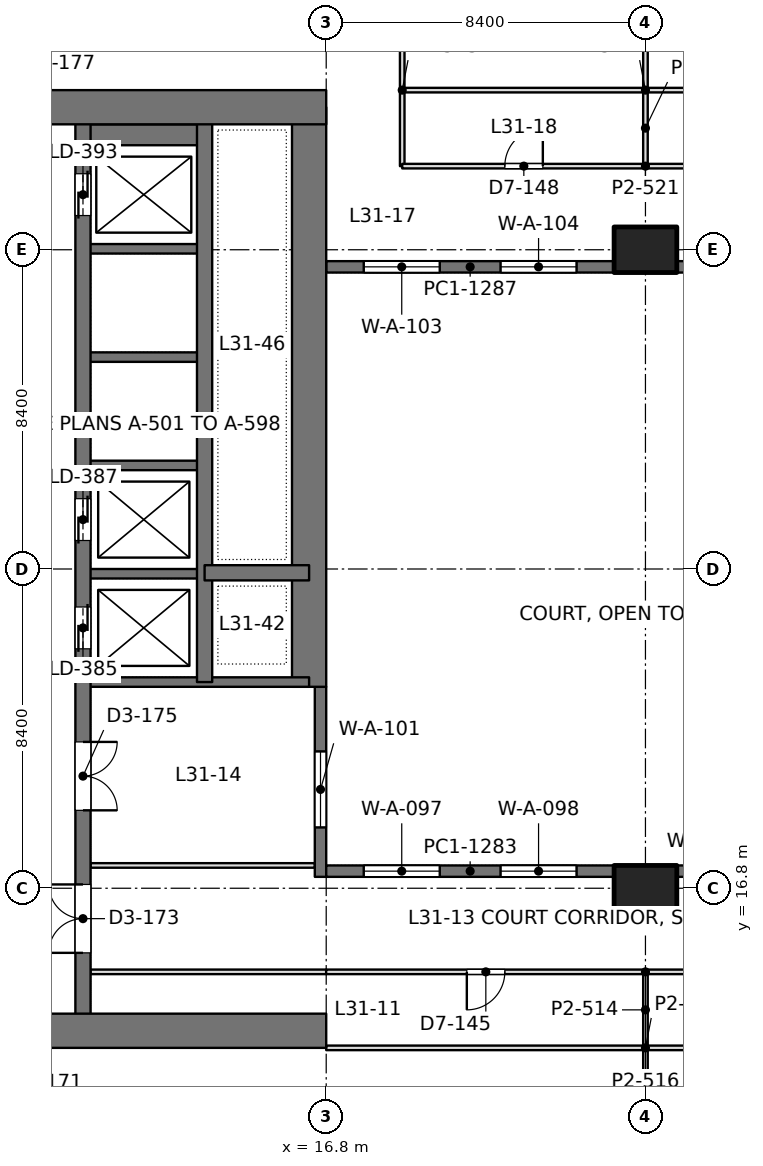
"""IFC4 building model, lengths in metres.
Left out: names, types, materials, properties, quantities, classifications, styles, units other than length and angle.
Written with IfcOpenShell. Run it as: python <this file> out.ifc"""

import sys

from ifc_helpers import new_model, si_unit, direction, frame, frame_2d, origin, origin_2d, place, context, subcontext, project, spatial, rectangle, extrude, element, fill, save


model = new_model("IFC4")
c1 = context("Model", 3, precision=1e-05, world=origin(), true_north=direction((0.0, 1.0)))
c2 = subcontext(c1, "Body", "Model", "MODEL_VIEW")
j1 = project(units=[si_unit("LENGTHUNIT", "METRE"), si_unit("PLANEANGLEUNIT", "RADIAN")], contexts=[c1])
p1 = place(None, origin())
s1 = spatial("IfcSite", under=j1, at=p1, CompositionType="ELEMENT")
p2 = place(p1, origin())
s2 = spatial("IfcBuilding", under=s1, at=p2, CompositionType="ELEMENT")
p3 = place(p2, frame((0.0, 0.0, 138.6)))
s3 = spatial("IfcBuildingStorey", under=s2, at=p3, CompositionType="ELEMENT", Elevation=138.6)
for number, where, z_axis, x_axis in (
    (1, (25.2, 16.8, 0.0), (0.0, 0.0, 1.0), (1.0, 0.0, 0.0)),
    (2, (25.2, 33.6, 0.0), (0.0, 0.0, 1.0), (1.0, 0.0, 0.0)),
):
    element("IfcColumn", number, at=place(p3, frame(where, z_axis=z_axis, x_axis=x_axis)), inside=s3, PredefinedType="COLUMN", context=c2, shape_type="SweptSolid", body=[
        extrude(rectangle(XDim=1.65, YDim=1.2, at=origin_2d()), origin(), (0.0, 0.0, 1.0), 4.2),
    ])
p4 = place(p3, frame((-1.2, 13.05, 0.0), z_axis=(0.0, 0.0, 1.0), x_axis=(1.0, 0.0, 0.0)))
e3 = element("IfcWall", 3, at=p4, inside=s3, PredefinedType="SHEAR", context=c2, shape_type="SweptSolid", body=[
    extrude(rectangle(XDim=18.0, YDim=0.9, at=frame_2d((9.0, 0.0))), origin(), (0.0, 0.0, 1.0), 4.2),
])
p5 = place(p4, frame((8.95, 0.0, 0.0)))
e4 = element("IfcOpeningElement", 4, at=p5, cuts=e3, PredefinedType="OPENING", context=c2, shape_type="SweptSolid", body=[
    extrude(rectangle(XDim=1.8, YDim=2.4, at=frame_2d((0.9, 1.2))), frame((0.0, 0.46, 0.0), z_axis=(0.0, -1.0, 0.0), x_axis=(1.0, 0.0, 0.0)), (0.0, 0.0, 1.0), 0.92),
])
p6 = place(p3, frame((-1.2, 37.35, 0.0), z_axis=(0.0, 0.0, 1.0), x_axis=(1.0, 0.0, 0.0)))
e5 = element("IfcWall", 5, at=p6, inside=s3, PredefinedType="SHEAR", context=c2, shape_type="SweptSolid", body=[
    extrude(rectangle(XDim=18.0, YDim=0.9, at=frame_2d((9.0, 0.0))), origin(), (0.0, 0.0, 1.0), 4.2),
])
p7 = place(p6, frame((8.95, 0.0, 0.0)))
e6 = element("IfcOpeningElement", 6, at=p7, cuts=e5, PredefinedType="OPENING", context=c2, shape_type="SweptSolid", body=[
    extrude(rectangle(XDim=1.8, YDim=2.4, at=frame_2d((0.9, 1.2))), frame((0.0, 0.46, 0.0), z_axis=(0.0, -1.0, 0.0), x_axis=(1.0, 0.0, 0.0)), (0.0, 0.0, 1.0), 0.92),
])
p8 = place(p3, frame((16.35, 22.1, 0.0), z_axis=(0.0, 0.0, 1.0), x_axis=(0.0, 1.0, 0.0)))
e7 = element("IfcWall", 7, at=p8, inside=s3, PredefinedType="SHEAR", context=c2, shape_type="SweptSolid", body=[
    extrude(rectangle(XDim=15.25, YDim=0.9, at=frame_2d((7.625, 0.0))), origin(), (0.0, 0.0, 1.0), 4.2),
])
p9 = place(p3, frame((10.4, 13.05, 0.0), z_axis=(0.0, 0.0, 1.0), x_axis=(0.0, 1.0, 0.0)))
e8 = element("IfcWall", 8, at=p9, inside=s3, PredefinedType="SHEAR", context=c2, shape_type="SweptSolid", body=[
    extrude(rectangle(XDim=24.3, YDim=0.4, at=frame_2d((12.15, 0.0))), origin(), (0.0, 0.0, 1.0), 4.2),
])
p10 = place(p9, frame((10.05, 0.0, 0.0)))
e9 = element("IfcOpeningElement", 9, at=p10, cuts=e8, PredefinedType="OPENING", context=c2, shape_type="SweptSolid", body=[
    extrude(rectangle(XDim=1.1, YDim=2.2, at=frame_2d((0.55, 1.1))), frame((0.0, 0.21, 0.0), z_axis=(0.0, -1.0, 0.0), x_axis=(1.0, 0.0, 0.0)), (0.0, 0.0, 1.0), 0.42),
])
p11 = place(p9, frame((12.9, 0.0, 0.0)))
e10 = element("IfcOpeningElement", 10, at=p11, cuts=e8, PredefinedType="OPENING", context=c2, shape_type="SweptSolid", body=[
    extrude(rectangle(XDim=1.1, YDim=2.2, at=frame_2d((0.55, 1.1))), frame((0.0, 0.21, 0.0), z_axis=(0.0, -1.0, 0.0), x_axis=(1.0, 0.0, 0.0)), (0.0, 0.0, 1.0), 0.42),
])
p12 = place(p9, frame((21.45, 0.0, 0.0)))
e11 = element("IfcOpeningElement", 11, at=p12, cuts=e8, PredefinedType="OPENING", context=c2, shape_type="SweptSolid", body=[
    extrude(rectangle(XDim=1.1, YDim=2.2, at=frame_2d((0.55, 1.1))), frame((0.0, 0.21, 0.0), z_axis=(0.0, -1.0, 0.0), x_axis=(1.0, 0.0, 0.0)), (0.0, 0.0, 1.0), 0.42),
])
p13 = place(p9, frame((2.05, 0.0, 0.0)))
e12 = element("IfcOpeningElement", 12, at=p13, cuts=e8, PredefinedType="OPENING", context=c2, shape_type="SweptSolid", body=[
    extrude(rectangle(XDim=1.8, YDim=2.4, at=frame_2d((0.9, 1.2))), frame((0.0, 0.21, 0.0), z_axis=(0.0, -1.0, 0.0), x_axis=(1.0, 0.0, 0.0)), (0.0, 0.0, 1.0), 0.42),
])
p14 = place(p9, frame((5.8, 0.0, 0.0)))
e13 = element("IfcOpeningElement", 13, at=p14, cuts=e8, PredefinedType="OPENING", context=c2, shape_type="SweptSolid", body=[
    extrude(rectangle(XDim=1.8, YDim=2.4, at=frame_2d((0.9, 1.2))), frame((0.0, 0.21, 0.0), z_axis=(0.0, -1.0, 0.0), x_axis=(1.0, 0.0, 0.0)), (0.0, 0.0, 1.0), 0.42),
])
p15 = place(p3, frame((13.6, 22.225, 0.0), z_axis=(0.0, 0.0, 1.0), x_axis=(0.0, 1.0, 0.0)))
e14 = element("IfcWall", 14, at=p15, inside=s3, PredefinedType="SHEAR", context=c2, shape_type="SweptSolid", body=[
    extrude(rectangle(XDim=15.125, YDim=0.4, at=frame_2d((7.562, 0.0))), origin(), (0.0, 0.0, 1.0), 4.2),
])
p16 = place(p3, frame((13.6, 25.1, 0.0), z_axis=(0.0, 0.0, 1.0), x_axis=(1.0, 0.0, 0.0)))
e15 = element("IfcWall", 15, at=p16, inside=s3, PredefinedType="SHEAR", context=c2, shape_type="SweptSolid", body=[
    extrude(rectangle(XDim=2.75, YDim=0.4, at=frame_2d((1.375, 0.0))), origin(), (0.0, 0.0, 1.0), 4.2),
])
p17 = place(p3, frame((10.4, 22.225, 0.0), z_axis=(0.0, 0.0, 1.0), x_axis=(1.0, 0.0, 0.0)))
e16 = element("IfcWall", 16, at=p17, inside=s3, PredefinedType="SHEAR", context=c2, shape_type="SweptSolid", body=[
    extrude(rectangle(XDim=5.95, YDim=0.25, at=frame_2d((2.975, 0.0))), origin(), (0.0, 0.0, 1.0), 4.2),
])
for number, where, z_axis, x_axis in (
    (17, (10.4, 25.075, 0.0), (0.0, 0.0, 1.0), (1.0, 0.0, 0.0)),
    (18, (10.4, 27.925, 0.0), (0.0, 0.0, 1.0), (1.0, 0.0, 0.0)),
    (19, (10.4, 30.775, 0.0), (0.0, 0.0, 1.0), (1.0, 0.0, 0.0)),
    (20, (10.4, 33.625, 0.0), (0.0, 0.0, 1.0), (1.0, 0.0, 0.0)),
):
    element("IfcWall", number, at=place(p3, frame(where, z_axis=z_axis, x_axis=x_axis)), inside=s3, PredefinedType="SHEAR", context=c2, shape_type="SweptSolid", body=[
        extrude(rectangle(XDim=3.2, YDim=0.25, at=frame_2d((1.6, 0.0))), origin(), (0.0, 0.0, 1.0), 4.2),
    ])
p18 = place(p3, frame((10.4, 36.625, 0.0), z_axis=(0.0, 0.0, 1.0), x_axis=(1.0, 0.0, 0.0)))
e21 = element("IfcWall", 21, at=p18, inside=s3, PredefinedType="SHEAR", context=c2, shape_type="SweptSolid", body=[
    extrude(rectangle(XDim=3.2, YDim=0.55, at=frame_2d((1.6, 0.0))), origin(), (0.0, 0.0, 1.0), 4.2),
])
p19 = place(p3, frame((16.65, 17.1, 0.0), z_axis=(0.0, 0.0, 1.0), x_axis=(0.0, 1.0, 0.0)))
e22 = element("IfcWall", 22, at=p19, inside=s3, PredefinedType="SOLIDWALL", context=c2, shape_type="SweptSolid", body=[
    extrude(rectangle(XDim=5.0, YDim=0.3, at=frame_2d((2.5, 0.0))), origin(), (0.0, 0.0, 1.0), 4.05),
])
p20 = place(p19, frame((1.3, 0.0, 0.1)))
e23 = element("IfcOpeningElement", 23, at=p20, cuts=e22, PredefinedType="OPENING", context=c2, shape_type="SweptSolid", body=[
    extrude(rectangle(XDim=2.0, YDim=3.0, at=frame_2d((1.0, 1.5))), frame((0.0, 0.16, 0.0), z_axis=(0.0, -1.0, 0.0), x_axis=(1.0, 0.0, 0.0)), (0.0, 0.0, 1.0), 0.32),
])
p21 = place(p3, frame((16.8, 17.25, 0.0), z_axis=(0.0, 0.0, 1.0), x_axis=(1.0, 0.0, 0.0)))
e24 = element("IfcWall", 24, at=p21, inside=s3, PredefinedType="SOLIDWALL", context=c2, shape_type="SweptSolid", body=[
    extrude(rectangle(XDim=7.575, YDim=0.3, at=frame_2d((3.788, 0.0))), origin(), (0.0, 0.0, 1.0), 4.05),
])
p22 = place(p21, frame((0.988, 0.0, 0.1)))
e25 = element("IfcOpeningElement", 25, at=p22, cuts=e24, PredefinedType="OPENING", context=c2, shape_type="SweptSolid", body=[
    extrude(rectangle(XDim=2.0, YDim=3.0, at=frame_2d((1.0, 1.5))), frame((0.0, 0.16, 0.0), z_axis=(0.0, -1.0, 0.0), x_axis=(1.0, 0.0, 0.0)), (0.0, 0.0, 1.0), 0.32),
])
p23 = place(p21, frame((4.587, 0.0, 0.1)))
e26 = element("IfcOpeningElement", 26, at=p23, cuts=e24, PredefinedType="OPENING", context=c2, shape_type="SweptSolid", body=[
    extrude(rectangle(XDim=2.0, YDim=3.0, at=frame_2d((1.0, 1.5))), frame((0.0, 0.16, 0.0), z_axis=(0.0, -1.0, 0.0), x_axis=(1.0, 0.0, 0.0)), (0.0, 0.0, 1.0), 0.32),
])
p24 = place(p3, frame((26.025, 17.25, 0.0), z_axis=(0.0, 0.0, 1.0), x_axis=(1.0, 0.0, 0.0)))
e27 = element("IfcWall", 27, at=p24, inside=s3, PredefinedType="SOLIDWALL", context=c2, shape_type="SweptSolid", body=[
    extrude(rectangle(XDim=7.575, YDim=0.3, at=frame_2d((3.788, 0.0))), origin(), (0.0, 0.0, 1.0), 4.05),
])
p25 = place(p24, frame((0.587, 0.0, 0.1)))
e28 = element("IfcOpeningElement", 28, at=p25, cuts=e27, PredefinedType="OPENING", context=c2, shape_type="SweptSolid", body=[
    extrude(rectangle(XDim=2.0, YDim=3.0, at=frame_2d((1.0, 1.5))), frame((0.0, 0.16, 0.0), z_axis=(0.0, -1.0, 0.0), x_axis=(1.0, 0.0, 0.0)), (0.0, 0.0, 1.0), 0.32),
])
p26 = place(p24, frame((4.188, 0.0, 0.1)))
e29 = element("IfcOpeningElement", 29, at=p26, cuts=e27, PredefinedType="OPENING", context=c2, shape_type="SweptSolid", body=[
    extrude(rectangle(XDim=2.0, YDim=3.0, at=frame_2d((1.0, 1.5))), frame((0.0, 0.16, 0.0), z_axis=(0.0, -1.0, 0.0), x_axis=(1.0, 0.0, 0.0)), (0.0, 0.0, 1.0), 0.32),
])
p27 = place(p3, frame((16.8, 33.15, 0.0), z_axis=(0.0, 0.0, 1.0), x_axis=(1.0, 0.0, 0.0)))
e30 = element("IfcWall", 30, at=p27, inside=s3, PredefinedType="SOLIDWALL", context=c2, shape_type="SweptSolid", body=[
    extrude(rectangle(XDim=7.575, YDim=0.3, at=frame_2d((3.788, 0.0))), origin(), (0.0, 0.0, 1.0), 4.05),
])
p28 = place(p27, frame((0.988, 0.0, 0.1)))
e31 = element("IfcOpeningElement", 31, at=p28, cuts=e30, PredefinedType="OPENING", context=c2, shape_type="SweptSolid", body=[
    extrude(rectangle(XDim=2.0, YDim=3.0, at=frame_2d((1.0, 1.5))), frame((0.0, 0.16, 0.0), z_axis=(0.0, -1.0, 0.0), x_axis=(1.0, 0.0, 0.0)), (0.0, 0.0, 1.0), 0.32),
])
p29 = place(p27, frame((4.587, 0.0, 0.1)))
e32 = element("IfcOpeningElement", 32, at=p29, cuts=e30, PredefinedType="OPENING", context=c2, shape_type="SweptSolid", body=[
    extrude(rectangle(XDim=2.0, YDim=3.0, at=frame_2d((1.0, 1.5))), frame((0.0, 0.16, 0.0), z_axis=(0.0, -1.0, 0.0), x_axis=(1.0, 0.0, 0.0)), (0.0, 0.0, 1.0), 0.32),
])
p30 = place(p3, frame((26.025, 33.15, 0.0), z_axis=(0.0, 0.0, 1.0), x_axis=(1.0, 0.0, 0.0)))
e33 = element("IfcWall", 33, at=p30, inside=s3, PredefinedType="SOLIDWALL", context=c2, shape_type="SweptSolid", body=[
    extrude(rectangle(XDim=7.575, YDim=0.3, at=frame_2d((3.788, 0.0))), origin(), (0.0, 0.0, 1.0), 4.05),
])
p31 = place(p30, frame((0.587, 0.0, 0.1)))
e34 = element("IfcOpeningElement", 34, at=p31, cuts=e33, PredefinedType="OPENING", context=c2, shape_type="SweptSolid", body=[
    extrude(rectangle(XDim=2.0, YDim=3.0, at=frame_2d((1.0, 1.5))), frame((0.0, 0.16, 0.0), z_axis=(0.0, -1.0, 0.0), x_axis=(1.0, 0.0, 0.0)), (0.0, 0.0, 1.0), 0.32),
])
p32 = place(p30, frame((4.188, 0.0, 0.1)))
e35 = element("IfcOpeningElement", 35, at=p32, cuts=e33, PredefinedType="OPENING", context=c2, shape_type="SweptSolid", body=[
    extrude(rectangle(XDim=2.0, YDim=3.0, at=frame_2d((1.0, 1.5))), frame((0.0, 0.16, 0.0), z_axis=(0.0, -1.0, 0.0), x_axis=(1.0, 0.0, 0.0)), (0.0, 0.0, 1.0), 0.32),
])
p33 = place(p3, frame((10.598, 17.4, 0.0), z_axis=(0.0, 0.0, 1.0), x_axis=(1.0, 0.0, 0.0)))
e36 = element("IfcWall", 36, at=p33, inside=s3, PredefinedType="PARTITIONING", context=c2, shape_type="SweptSolid", body=[
    extrude(rectangle(XDim=5.904, YDim=0.12, at=frame_2d((2.952, 0.0))), origin(), (0.0, 0.0, 1.0), 3.55),
])
p34 = place(p3, frame((25.2, 9.099, 0.0), z_axis=(0.0, 0.0, 1.0), x_axis=(0.0, 1.0, 0.0)))
e37 = element("IfcWall", 37, at=p34, inside=s3, PredefinedType="PARTITIONING", context=c2, shape_type="SweptSolid", body=[
    extrude(rectangle(XDim=3.443, YDim=0.12, at=frame_2d((1.721, 0.0))), origin(), (0.0, 0.0, 1.0), 3.55),
])
p35 = place(p3, frame((10.598, 14.6, 0.0), z_axis=(0.0, 0.0, 1.0), x_axis=(1.0, 0.0, 0.0)))
e38 = element("IfcWall", 38, at=p35, inside=s3, PredefinedType="PARTITIONING", context=c2, shape_type="SweptSolid", body=[
    extrude(rectangle(XDim=6.204, YDim=0.12, at=frame_2d((3.102, 0.0))), origin(), (0.0, 0.0, 1.0), 3.55),
])
p36 = place(p3, frame((25.2, 12.658, 0.0), z_axis=(0.0, 0.0, 1.0), x_axis=(0.0, 1.0, 0.0)))
e39 = element("IfcWall", 39, at=p36, inside=s3, PredefinedType="PARTITIONING", context=c2, shape_type="SweptSolid", body=[
    extrude(rectangle(XDim=1.884, YDim=0.12, at=frame_2d((0.942, 0.0))), origin(), (0.0, 0.0, 1.0), 3.55),
])
p37 = place(p3, frame((16.798, 14.6, 0.0), z_axis=(0.0, 0.0, 1.0), x_axis=(1.0, 0.0, 0.0)))
e40 = element("IfcWall", 40, at=p37, inside=s3, PredefinedType="PARTITIONING", context=c2, shape_type="SweptSolid", body=[
    extrude(rectangle(XDim=16.804, YDim=0.12, at=frame_2d((8.402, 0.0))), origin(), (0.0, 0.0, 1.0), 3.55),
])
p38 = place(p37, frame((3.702, 0.0, 0.0)))
e41 = element("IfcOpeningElement", 41, at=p38, cuts=e40, PredefinedType="OPENING", context=c2, shape_type="SweptSolid", body=[
    extrude(rectangle(XDim=1.0, YDim=2.4, at=frame_2d((0.5, 1.2))), frame((0.0, 0.07, 0.0), z_axis=(0.0, -1.0, 0.0), x_axis=(1.0, 0.0, 0.0)), (0.0, 0.0, 1.0), 0.14),
])
p39 = place(p37, frame((12.102, 0.0, 0.0)))
e42 = element("IfcOpeningElement", 42, at=p39, cuts=e40, PredefinedType="OPENING", context=c2, shape_type="SweptSolid", body=[
    extrude(rectangle(XDim=1.0, YDim=2.4, at=frame_2d((0.5, 1.2))), frame((0.0, 0.07, 0.0), z_axis=(0.0, -1.0, 0.0), x_axis=(1.0, 0.0, 0.0)), (0.0, 0.0, 1.0), 0.14),
])
p40 = place(p3, frame((16.8, 12.6, 0.0), z_axis=(0.0, 0.0, 1.0), x_axis=(1.0, 0.0, 0.0)))
e43 = element("IfcWall", 43, at=p40, inside=s3, PredefinedType="PARTITIONING", context=c2, shape_type="SweptSolid", body=[
    extrude(rectangle(XDim=16.8, YDim=0.12, at=frame_2d((8.4, 0.0))), origin(), (0.0, 0.0, 1.0), 3.55),
])
p41 = place(p3, frame((25.2, 37.858, 0.0), z_axis=(0.0, 0.0, 1.0), x_axis=(0.0, 1.0, 0.0)))
e44 = element("IfcWall", 44, at=p41, inside=s3, PredefinedType="PARTITIONING", context=c2, shape_type="SweptSolid", body=[
    extrude(rectangle(XDim=3.443, YDim=0.12, at=frame_2d((1.722, 0.0))), origin(), (0.0, 0.0, 1.0), 3.55),
])
p42 = place(p3, frame((18.8, 35.8, 0.0), z_axis=(0.0, 0.0, 1.0), x_axis=(0.0, 1.0, 0.0)))
e45 = element("IfcWall", 45, at=p42, inside=s3, PredefinedType="PARTITIONING", context=c2, shape_type="SweptSolid", body=[
    extrude(rectangle(XDim=4.0, YDim=0.12, at=frame_2d((2.0, 0.0))), origin(), (0.0, 0.0, 1.0), 4.05),
])
p43 = place(p3, frame((25.2, 35.858, 0.0), z_axis=(0.0, 0.0, 1.0), x_axis=(0.0, 1.0, 0.0)))
e46 = element("IfcWall", 46, at=p43, inside=s3, PredefinedType="PARTITIONING", context=c2, shape_type="SweptSolid", body=[
    extrude(rectangle(XDim=1.884, YDim=0.12, at=frame_2d((0.942, 0.0))), origin(), (0.0, 0.0, 1.0), 3.55),
])
p44 = place(p3, frame((18.8, 35.8, 0.0), z_axis=(0.0, 0.0, 1.0), x_axis=(1.0, 0.0, 0.0)))
e47 = element("IfcWall", 47, at=p44, inside=s3, PredefinedType="PARTITIONING", context=c2, shape_type="SweptSolid", body=[
    extrude(rectangle(XDim=12.8, YDim=0.12, at=frame_2d((6.4, 0.0))), origin(), (0.0, 0.0, 1.0), 3.55),
])
p45 = place(p44, frame((2.7, 0.0, 0.0)))
e48 = element("IfcOpeningElement", 48, at=p45, cuts=e47, PredefinedType="OPENING", context=c2, shape_type="SweptSolid", body=[
    extrude(rectangle(XDim=1.0, YDim=2.4, at=frame_2d((0.5, 1.2))), frame((0.0, 0.07, 0.0), z_axis=(0.0, -1.0, 0.0), x_axis=(1.0, 0.0, 0.0)), (0.0, 0.0, 1.0), 0.14),
])
p46 = place(p44, frame((9.1, 0.0, 0.0)))
e49 = element("IfcOpeningElement", 49, at=p46, cuts=e47, PredefinedType="OPENING", context=c2, shape_type="SweptSolid", body=[
    extrude(rectangle(XDim=1.0, YDim=2.4, at=frame_2d((0.5, 1.2))), frame((0.0, 0.07, 0.0), z_axis=(0.0, -1.0, 0.0), x_axis=(1.0, 0.0, 0.0)), (0.0, 0.0, 1.0), 0.14),
])
p47 = place(p3, frame((18.858, 37.8, 0.0), z_axis=(0.0, 0.0, 1.0), x_axis=(1.0, 0.0, 0.0)))
e50 = element("IfcWall", 50, at=p47, inside=s3, PredefinedType="PARTITIONING", context=c2, shape_type="SweptSolid", body=[
    extrude(rectangle(XDim=12.684, YDim=0.12, at=frame_2d((6.342, 0.0))), origin(), (0.0, 0.0, 1.0), 3.55),
])
p48 = place(p20, origin())
e51 = element("IfcWindow", 51, at=p48, inside=s3, PartitioningType="SINGLE_PANEL", PredefinedType="WINDOW", context=c2, shape_type="SweptSolid", body=[
    extrude(rectangle(XDim=2.0, YDim=3.0, at=frame_2d((1.0, 1.5))), frame((0.0, 0.03, 0.0), z_axis=(0.0, -1.0, 0.0), x_axis=(1.0, 0.0, 0.0)), (0.0, 0.0, 1.0), 0.06),
])
fill(e23, e51)
p49 = place(p22, origin())
e52 = element("IfcWindow", 52, at=p49, inside=s3, PartitioningType="SINGLE_PANEL", PredefinedType="WINDOW", context=c2, shape_type="SweptSolid", body=[
    extrude(rectangle(XDim=2.0, YDim=3.0, at=frame_2d((1.0, 1.5))), frame((0.0, 0.03, 0.0), z_axis=(0.0, -1.0, 0.0), x_axis=(1.0, 0.0, 0.0)), (0.0, 0.0, 1.0), 0.06),
])
fill(e25, e52)
p50 = place(p23, origin())
e53 = element("IfcWindow", 53, at=p50, inside=s3, PartitioningType="SINGLE_PANEL", PredefinedType="WINDOW", context=c2, shape_type="SweptSolid", body=[
    extrude(rectangle(XDim=2.0, YDim=3.0, at=frame_2d((1.0, 1.5))), frame((0.0, 0.03, 0.0), z_axis=(0.0, -1.0, 0.0), x_axis=(1.0, 0.0, 0.0)), (0.0, 0.0, 1.0), 0.06),
])
fill(e26, e53)
p51 = place(p28, origin())
e54 = element("IfcWindow", 54, at=p51, inside=s3, PartitioningType="SINGLE_PANEL", PredefinedType="WINDOW", context=c2, shape_type="SweptSolid", body=[
    extrude(rectangle(XDim=2.0, YDim=3.0, at=frame_2d((1.0, 1.5))), frame((0.0, 0.03, 0.0), z_axis=(0.0, -1.0, 0.0), x_axis=(1.0, 0.0, 0.0)), (0.0, 0.0, 1.0), 0.06),
])
fill(e31, e54)
p52 = place(p29, origin())
e55 = element("IfcWindow", 55, at=p52, inside=s3, PartitioningType="SINGLE_PANEL", PredefinedType="WINDOW", context=c2, shape_type="SweptSolid", body=[
    extrude(rectangle(XDim=2.0, YDim=3.0, at=frame_2d((1.0, 1.5))), frame((0.0, 0.03, 0.0), z_axis=(0.0, -1.0, 0.0), x_axis=(1.0, 0.0, 0.0)), (0.0, 0.0, 1.0), 0.06),
])
fill(e32, e55)
p53 = place(p10, origin())
e56 = element("IfcDoor", 56, at=p53, inside=s3, OperationType="DOUBLE_DOOR_SLIDING", PredefinedType="DOOR", context=c2, shape_type="SweptSolid", body=[
    extrude(rectangle(XDim=1.1, YDim=2.2, at=frame_2d((0.55, 1.1))), frame((0.0, 0.025, 0.0), z_axis=(0.0, -1.0, 0.0), x_axis=(1.0, 0.0, 0.0)), (0.0, 0.0, 1.0), 0.05),
])
fill(e9, e56)
p54 = place(p11, origin())
e57 = element("IfcDoor", 57, at=p54, inside=s3, OperationType="DOUBLE_DOOR_SLIDING", PredefinedType="DOOR", context=c2, shape_type="SweptSolid", body=[
    extrude(rectangle(XDim=1.1, YDim=2.2, at=frame_2d((0.55, 1.1))), frame((0.0, 0.025, 0.0), z_axis=(0.0, -1.0, 0.0), x_axis=(1.0, 0.0, 0.0)), (0.0, 0.0, 1.0), 0.05),
])
fill(e10, e57)
p55 = place(p12, origin())
e58 = element("IfcDoor", 58, at=p55, inside=s3, OperationType="DOUBLE_DOOR_SLIDING", PredefinedType="DOOR", context=c2, shape_type="SweptSolid", body=[
    extrude(rectangle(XDim=1.1, YDim=2.2, at=frame_2d((0.55, 1.1))), frame((0.0, 0.025, 0.0), z_axis=(0.0, -1.0, 0.0), x_axis=(1.0, 0.0, 0.0)), (0.0, 0.0, 1.0), 0.05),
])
fill(e11, e58)
p56 = place(p13, origin())
e59 = element("IfcDoor", 59, at=p56, inside=s3, OperationType="DOUBLE_DOOR_SINGLE_SWING", PredefinedType="DOOR", context=c2, shape_type="SweptSolid", body=[
    extrude(rectangle(XDim=1.8, YDim=2.4, at=frame_2d((0.9, 1.2))), frame((0.0, 0.025, 0.0), z_axis=(0.0, -1.0, 0.0), x_axis=(1.0, 0.0, 0.0)), (0.0, 0.0, 1.0), 0.05),
])
fill(e12, e59)
p57 = place(p14, frame((1.8, 0.0, 0.0), z_axis=(0.0, 0.0, 1.0), x_axis=(-1.0, 0.0, 0.0)))
e60 = element("IfcDoor", 60, at=p57, inside=s3, OperationType="DOUBLE_DOOR_SINGLE_SWING", PredefinedType="DOOR", context=c2, shape_type="SweptSolid", body=[
    extrude(rectangle(XDim=1.8, YDim=2.4, at=frame_2d((0.9, 1.2))), frame((0.0, 0.025, 0.0), z_axis=(0.0, -1.0, 0.0), x_axis=(1.0, 0.0, 0.0)), (0.0, 0.0, 1.0), 0.05),
])
fill(e13, e60)
p58 = place(p38, frame((1.0, 0.0, 0.0), z_axis=(0.0, 0.0, 1.0), x_axis=(-1.0, 0.0, 0.0)))
e61 = element("IfcDoor", 61, at=p58, inside=s3, OperationType="SINGLE_SWING_RIGHT", PredefinedType="DOOR", context=c2, shape_type="SweptSolid", body=[
    extrude(rectangle(XDim=1.0, YDim=2.4, at=frame_2d((0.5, 1.2))), frame((0.0, 0.025, 0.0), z_axis=(0.0, -1.0, 0.0), x_axis=(1.0, 0.0, 0.0)), (0.0, 0.0, 1.0), 0.05),
])
fill(e41, e61)
p59 = place(p45, origin())
e62 = element("IfcDoor", 62, at=p59, inside=s3, OperationType="SINGLE_SWING_RIGHT", PredefinedType="DOOR", context=c2, shape_type="SweptSolid", body=[
    extrude(rectangle(XDim=1.0, YDim=2.4, at=frame_2d((0.5, 1.2))), frame((0.0, 0.025, 0.0), z_axis=(0.0, -1.0, 0.0), x_axis=(1.0, 0.0, 0.0)), (0.0, 0.0, 1.0), 0.05),
])
fill(e48, e62)
save(model, sys.argv[1])
